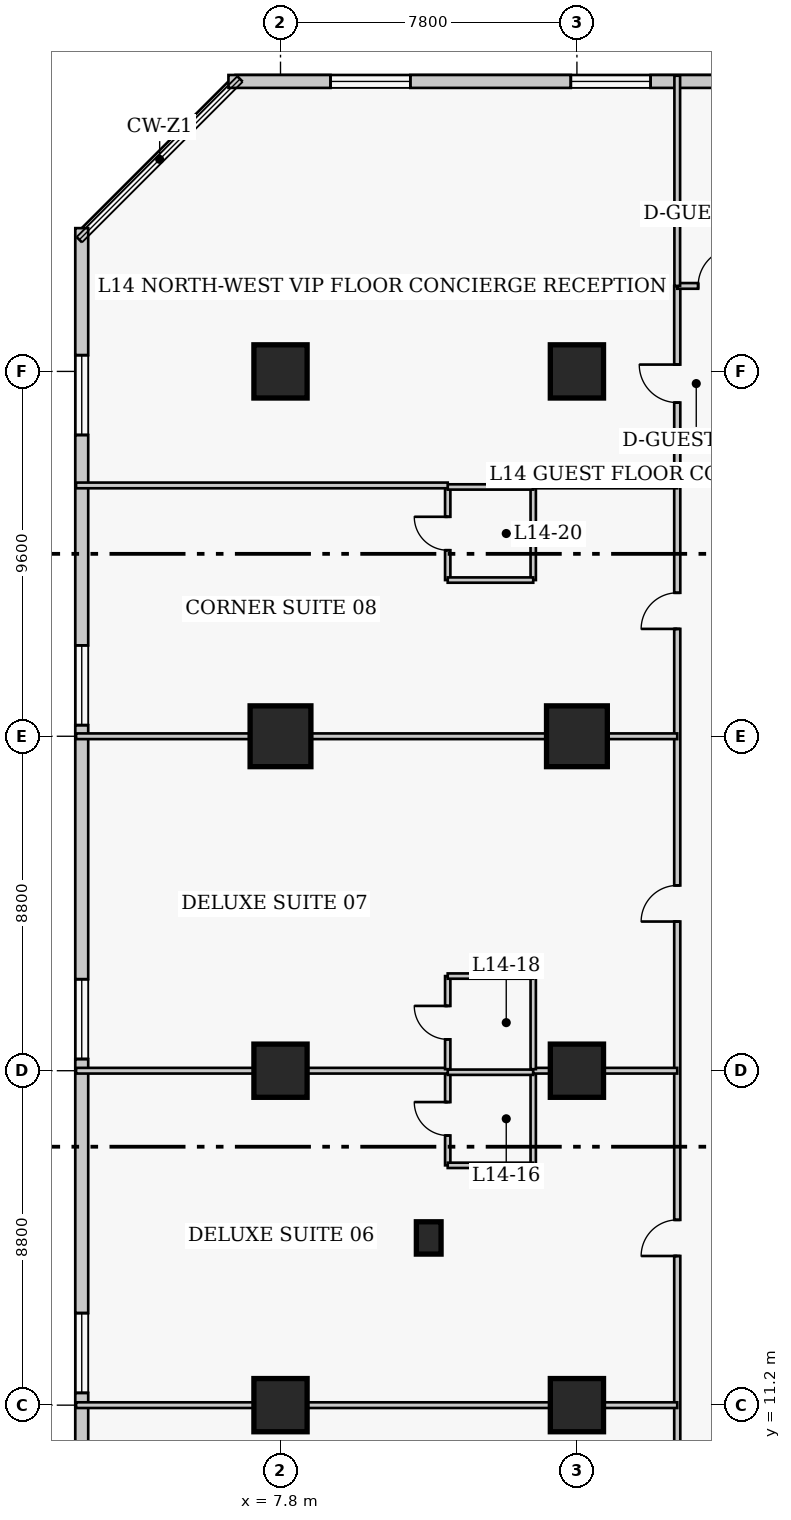
"""IFC4 building model, lengths in metres.
Left out: names, types, materials, properties, quantities, classifications, styles, units other than length and angle.
Written with IfcOpenShell. Run it as: python <this file> out.ifc"""

import sys

from ifc_helpers import new_model, si_unit, direction, frame, frame_2d, origin, origin_2d, place, context, subcontext, project, spatial, rectangle, extrude, element, fill, save


model = new_model("IFC4")
c1 = context("Model", 3, precision=1e-05, world=origin(), true_north=direction((0.0, 1.0)))
c2 = subcontext(c1, "Body", "Model", "MODEL_VIEW")
j1 = project(units=[si_unit("LENGTHUNIT", "METRE"), si_unit("PLANEANGLEUNIT", "RADIAN")], contexts=[c1])
p1 = place(None, origin())
s1 = spatial("IfcSite", under=j1, at=p1, CompositionType="ELEMENT")
p2 = place(p1, origin())
s2 = spatial("IfcBuilding", under=s1, at=p2, CompositionType="ELEMENT")
p3 = place(p2, frame((0.0, 0.0, 60.2)))
s3 = spatial("IfcBuildingStorey", under=s2, at=p3, CompositionType="ELEMENT", Elevation=60.2)
for number, where, z_axis, x_axis in (
    (1, (7.8, 11.2, 0.0), (0.0, 0.0, 1.0), (1.0, 0.0, 0.0)),
    (2, (7.8, 20.0, 0.0), (0.0, 0.0, 1.0), (1.0, 0.0, 0.0)),
):
    element("IfcColumn", number, at=place(p3, frame(where, z_axis=z_axis, x_axis=x_axis)), inside=s3, PredefinedType="COLUMN", context=c2, shape_type="SweptSolid", body=[
        extrude(rectangle(XDim=1.4, YDim=1.4, at=origin_2d()), origin(), (0.0, 0.0, 1.0), 3.8),
    ])
p4 = place(p3, frame((7.8, 28.8, 0.0), z_axis=(0.0, 0.0, 1.0), x_axis=(1.0, 0.0, 0.0)))
e3 = element("IfcColumn", 3, at=p4, inside=s3, PredefinedType="COLUMN", context=c2, shape_type="SweptSolid", body=[
    extrude(rectangle(XDim=1.6, YDim=1.6, at=origin_2d()), origin(), (0.0, 0.0, 1.0), 3.8),
])
for number, where, z_axis, x_axis in (
    (4, (7.8, 38.4, 0.0), (0.0, 0.0, 1.0), (1.0, 0.0, 0.0)),
    (5, (15.6, 11.2, 0.0), (0.0, 0.0, 1.0), (1.0, 0.0, 0.0)),
    (6, (15.6, 20.0, 0.0), (0.0, 0.0, 1.0), (1.0, 0.0, 0.0)),
):
    element("IfcColumn", number, at=place(p3, frame(where, z_axis=z_axis, x_axis=x_axis)), inside=s3, PredefinedType="COLUMN", context=c2, shape_type="SweptSolid", body=[
        extrude(rectangle(XDim=1.4, YDim=1.4, at=origin_2d()), origin(), (0.0, 0.0, 1.0), 3.8),
    ])
p5 = place(p3, frame((15.6, 28.8, 0.0), z_axis=(0.0, 0.0, 1.0), x_axis=(1.0, 0.0, 0.0)))
e7 = element("IfcColumn", 7, at=p5, inside=s3, PredefinedType="COLUMN", context=c2, shape_type="SweptSolid", body=[
    extrude(rectangle(XDim=1.6, YDim=1.6, at=origin_2d()), origin(), (0.0, 0.0, 1.0), 3.8),
])
p6 = place(p3, frame((15.6, 38.4, 0.0), z_axis=(0.0, 0.0, 1.0), x_axis=(1.0, 0.0, 0.0)))
e8 = element("IfcColumn", 8, at=p6, inside=s3, PredefinedType="COLUMN", context=c2, shape_type="SweptSolid", body=[
    extrude(rectangle(XDim=1.4, YDim=1.4, at=origin_2d()), origin(), (0.0, 0.0, 1.0), 3.8),
])
p7 = place(p3, frame((11.7, 15.6, 0.0), z_axis=(0.0, 0.0, 1.0), x_axis=(1.0, 0.0, 0.0)))
e9 = element("IfcColumn", 9, at=p7, inside=s3, PredefinedType="PILASTER", context=c2, shape_type="SweptSolid", body=[
    extrude(rectangle(XDim=0.65, YDim=0.85, at=origin_2d()), origin(), (0.0, 0.0, 1.0), 3.8),
])
p8 = place(p3, frame((36.32, 46.03, 0.0), z_axis=(0.0, 0.0, 1.0), x_axis=(-1.0, 0.0, 0.0)))
e10 = element("IfcWall", 10, at=p8, inside=s3, PredefinedType="SOLIDWALL", context=c2, shape_type="SweptSolid", body=[
    extrude(rectangle(XDim=29.89, YDim=0.34, at=frame_2d((14.945, 0.0))), origin(), (0.0, 0.0, 1.0), 3.54),
])
p9 = place(p8, frame((2.686, 0.0, 0.85)))
e11 = element("IfcOpeningElement", 11, at=p9, cuts=e10, PredefinedType="OPENING", context=c2, shape_type="SweptSolid", body=[
    extrude(rectangle(XDim=2.1, YDim=1.85, at=frame_2d((1.05, 0.925))), frame((0.0, 0.18, 0.0), z_axis=(0.0, -1.0, 0.0), x_axis=(1.0, 0.0, 0.0)), (0.0, 0.0, 1.0), 0.36),
])
p10 = place(p8, frame((10.159, 0.0, 0.85)))
e12 = element("IfcOpeningElement", 12, at=p10, cuts=e10, PredefinedType="OPENING", context=c2, shape_type="SweptSolid", body=[
    extrude(rectangle(XDim=2.1, YDim=1.85, at=frame_2d((1.05, 0.925))), frame((0.0, 0.18, 0.0), z_axis=(0.0, -1.0, 0.0), x_axis=(1.0, 0.0, 0.0)), (0.0, 0.0, 1.0), 0.36),
])
p11 = place(p8, frame((18.781, 0.0, 0.85)))
e13 = element("IfcOpeningElement", 13, at=p11, cuts=e10, PredefinedType="OPENING", context=c2, shape_type="SweptSolid", body=[
    extrude(rectangle(XDim=2.1, YDim=1.85, at=frame_2d((1.05, 0.925))), frame((0.0, 0.18, 0.0), z_axis=(0.0, -1.0, 0.0), x_axis=(1.0, 0.0, 0.0)), (0.0, 0.0, 1.0), 0.36),
])
p12 = place(p8, frame((25.104, 0.0, 0.85)))
e14 = element("IfcOpeningElement", 14, at=p12, cuts=e10, PredefinedType="OPENING", context=c2, shape_type="SweptSolid", body=[
    extrude(rectangle(XDim=2.1, YDim=1.85, at=frame_2d((1.05, 0.925))), frame((0.0, 0.18, 0.0), z_axis=(0.0, -1.0, 0.0), x_axis=(1.0, 0.0, 0.0)), (0.0, 0.0, 1.0), 0.36),
])
p13 = place(p3, frame((2.57, 42.17, 0.0), z_axis=(0.0, 0.0, 1.0), x_axis=(0.0, -1.0, 0.0)))
e15 = element("IfcWall", 15, at=p13, inside=s3, PredefinedType="SOLIDWALL", context=c2, shape_type="SweptSolid", body=[
    extrude(rectangle(XDim=35.14, YDim=0.34, at=frame_2d((17.57, 0.0))), origin(), (0.0, 0.0, 1.0), 3.54),
])
p14 = place(p13, frame((3.343, 0.0, 0.85)))
e16 = element("IfcOpeningElement", 16, at=p14, cuts=e15, PredefinedType="OPENING", context=c2, shape_type="SweptSolid", body=[
    extrude(rectangle(XDim=2.1, YDim=1.85, at=frame_2d((1.05, 0.925))), frame((0.0, 0.18, 0.0), z_axis=(0.0, -1.0, 0.0), x_axis=(1.0, 0.0, 0.0)), (0.0, 0.0, 1.0), 0.36),
])
p15 = place(p13, frame((10.978, 0.0, 0.85)))
e17 = element("IfcOpeningElement", 17, at=p15, cuts=e15, PredefinedType="OPENING", context=c2, shape_type="SweptSolid", body=[
    extrude(rectangle(XDim=2.1, YDim=1.85, at=frame_2d((1.05, 0.925))), frame((0.0, 0.18, 0.0), z_axis=(0.0, -1.0, 0.0), x_axis=(1.0, 0.0, 0.0)), (0.0, 0.0, 1.0), 0.36),
])
p16 = place(p13, frame((19.762, 0.0, 0.85)))
e18 = element("IfcOpeningElement", 18, at=p16, cuts=e15, PredefinedType="OPENING", context=c2, shape_type="SweptSolid", body=[
    extrude(rectangle(XDim=2.1, YDim=1.85, at=frame_2d((1.05, 0.925))), frame((0.0, 0.18, 0.0), z_axis=(0.0, -1.0, 0.0), x_axis=(1.0, 0.0, 0.0)), (0.0, 0.0, 1.0), 0.36),
])
p17 = place(p13, frame((28.548, 0.0, 0.85)))
e19 = element("IfcOpeningElement", 19, at=p17, cuts=e15, PredefinedType="OPENING", context=c2, shape_type="SweptSolid", body=[
    extrude(rectangle(XDim=2.1, YDim=1.85, at=frame_2d((1.05, 0.925))), frame((0.0, 0.18, 0.0), z_axis=(0.0, -1.0, 0.0), x_axis=(1.0, 0.0, 0.0)), (0.0, 0.0, 1.0), 0.36),
])
p18 = place(p3, frame((18.24, 5.05, 0.0), z_axis=(0.0, 0.0, 1.0), x_axis=(0.0, 1.0, 0.0)))
e20 = element("IfcWall", 20, at=p18, inside=s3, PredefinedType="PARTITIONING", context=c2, shape_type="SweptSolid", body=[
    extrude(rectangle(XDim=35.6, YDim=0.16, at=frame_2d((17.8, 0.0))), origin(), (0.0, 0.0, 1.0), 3.54),
])
p19 = place(p18, frame((2.6, 0.0, 0.0)))
e21 = element("IfcOpeningElement", 21, at=p19, cuts=e20, PredefinedType="OPENING", context=c2, shape_type="SweptSolid", body=[
    extrude(rectangle(XDim=0.95, YDim=2.1, at=frame_2d((0.475, 1.05))), frame((0.0, 0.09, 0.0), z_axis=(0.0, -1.0, 0.0), x_axis=(1.0, 0.0, 0.0)), (0.0, 0.0, 1.0), 0.18),
])
p20 = place(p18, frame((10.075, 0.0, 0.0)))
e22 = element("IfcOpeningElement", 22, at=p20, cuts=e20, PredefinedType="OPENING", context=c2, shape_type="SweptSolid", body=[
    extrude(rectangle(XDim=0.95, YDim=2.1, at=frame_2d((0.475, 1.05))), frame((0.0, 0.09, 0.0), z_axis=(0.0, -1.0, 0.0), x_axis=(1.0, 0.0, 0.0)), (0.0, 0.0, 1.0), 0.18),
])
p21 = place(p18, frame((18.875, 0.0, 0.0)))
e23 = element("IfcOpeningElement", 23, at=p21, cuts=e20, PredefinedType="OPENING", context=c2, shape_type="SweptSolid", body=[
    extrude(rectangle(XDim=0.95, YDim=2.1, at=frame_2d((0.475, 1.05))), frame((0.0, 0.09, 0.0), z_axis=(0.0, -1.0, 0.0), x_axis=(1.0, 0.0, 0.0)), (0.0, 0.0, 1.0), 0.18),
])
p22 = place(p18, frame((26.575, 0.0, 0.0)))
e24 = element("IfcOpeningElement", 24, at=p22, cuts=e20, PredefinedType="OPENING", context=c2, shape_type="SweptSolid", body=[
    extrude(rectangle(XDim=0.95, YDim=2.1, at=frame_2d((0.475, 1.05))), frame((0.0, 0.09, 0.0), z_axis=(0.0, -1.0, 0.0), x_axis=(1.0, 0.0, 0.0)), (0.0, 0.0, 1.0), 0.18),
])
p23 = place(p18, frame((32.53, 0.0, 0.0)))
e25 = element("IfcOpeningElement", 25, at=p23, cuts=e20, PredefinedType="OPENING", context=c2, shape_type="SweptSolid", body=[
    extrude(rectangle(XDim=1.0, YDim=2.15, at=frame_2d((0.5, 1.075))), frame((0.0, 0.09, 0.0), z_axis=(0.0, -1.0, 0.0), x_axis=(1.0, 0.0, 0.0)), (0.0, 0.0, 1.0), 0.18),
])
p24 = place(p3, frame((18.24, 40.65, 0.0), z_axis=(0.0, 0.0, 1.0), x_axis=(1.0, 0.0, 0.0)))
e26 = element("IfcWall", 26, at=p24, inside=s3, PredefinedType="PARTITIONING", context=c2, shape_type="SweptSolid", body=[
    extrude(rectangle(XDim=3.86, YDim=0.15, at=frame_2d((1.93, 0.0))), origin(), (0.0, 0.0, 1.0), 3.54),
])
p25 = place(p24, frame((0.55, 0.0, 0.0)))
e27 = element("IfcOpeningElement", 27, at=p25, cuts=e26, PredefinedType="OPENING", context=c2, shape_type="SweptSolid", body=[
    extrude(rectangle(XDim=1.0, YDim=2.15, at=frame_2d((0.5, 1.075))), frame((0.0, 0.085, 0.0), z_axis=(0.0, -1.0, 0.0), x_axis=(1.0, 0.0, 0.0)), (0.0, 0.0, 1.0), 0.17),
])
p26 = place(p3, frame((18.24, 40.65, 0.0), z_axis=(0.0, 0.0, 1.0), x_axis=(0.0, 1.0, 0.0)))
e28 = element("IfcWall", 28, at=p26, inside=s3, PredefinedType="PARTITIONING", context=c2, shape_type="SweptSolid", body=[
    extrude(rectangle(XDim=5.53, YDim=0.15, at=frame_2d((2.765, 0.0))), origin(), (0.0, 0.0, 1.0), 3.54),
])
p27 = place(p3, frame((2.42, 11.2, 0.0), z_axis=(0.0, 0.0, 1.0), x_axis=(1.0, 0.0, 0.0)))
e29 = element("IfcWall", 29, at=p27, inside=s3, PredefinedType="PARTITIONING", context=c2, shape_type="SweptSolid", body=[
    extrude(rectangle(XDim=15.82, YDim=0.15, at=frame_2d((7.91, 0.0))), origin(), (0.0, 0.0, 1.0), 2.593),
])
p28 = place(p3, frame((12.2, 17.51, 0.0), z_axis=(0.0, 0.0, 1.0), x_axis=(0.0, 1.0, 0.0)))
e30 = element("IfcWall", 30, at=p28, inside=s3, PredefinedType="PLUMBINGWALL", context=c2, shape_type="SweptSolid", body=[
    extrude(rectangle(XDim=2.45, YDim=0.14, at=frame_2d((1.225, 0.0))), origin(), (0.0, 0.0, 1.0), 3.54),
])
p29 = place(p28, frame((0.785, 0.0, 0.0)))
e31 = element("IfcOpeningElement", 31, at=p29, cuts=e30, PredefinedType="OPENING", context=c2, shape_type="SweptSolid", body=[
    extrude(rectangle(XDim=0.88, YDim=2.05, at=frame_2d((0.44, 1.025))), frame((0.0, 0.08, 0.0), z_axis=(0.0, -1.0, 0.0), x_axis=(1.0, 0.0, 0.0)), (0.0, 0.0, 1.0), 0.16),
])
p30 = place(p3, frame((14.45, 17.51, 0.0), z_axis=(0.0, 0.0, 1.0), x_axis=(0.0, 1.0, 0.0)))
e32 = element("IfcWall", 32, at=p30, inside=s3, PredefinedType="PLUMBINGWALL", context=c2, shape_type="SweptSolid", body=[
    extrude(rectangle(XDim=2.45, YDim=0.14, at=frame_2d((1.225, 0.0))), origin(), (0.0, 0.0, 1.0), 3.54),
])
p31 = place(p3, frame((12.2, 17.51, 0.0), z_axis=(0.0, 0.0, 1.0), x_axis=(1.0, 0.0, 0.0)))
e33 = element("IfcWall", 33, at=p31, inside=s3, PredefinedType="PLUMBINGWALL", context=c2, shape_type="SweptSolid", body=[
    extrude(rectangle(XDim=2.25, YDim=0.14, at=frame_2d((1.125, 0.0))), origin(), (0.0, 0.0, 1.0), 3.54),
])
p32 = place(p3, frame((12.2, 19.96, 0.0), z_axis=(0.0, 0.0, 1.0), x_axis=(1.0, 0.0, 0.0)))
e34 = element("IfcWall", 34, at=p32, inside=s3, PredefinedType="PLUMBINGWALL", context=c2, shape_type="SweptSolid", body=[
    extrude(rectangle(XDim=2.25, YDim=0.14, at=frame_2d((1.125, 0.0))), origin(), (0.0, 0.0, 1.0), 2.593),
])
p33 = place(p3, frame((2.42, 20.0, 0.0), z_axis=(0.0, 0.0, 1.0), x_axis=(1.0, 0.0, 0.0)))
e35 = element("IfcWall", 35, at=p33, inside=s3, PredefinedType="PARTITIONING", context=c2, shape_type="SweptSolid", body=[
    extrude(rectangle(XDim=9.78, YDim=0.15, at=frame_2d((4.89, 0.0))), origin(), (0.0, 0.0, 1.0), 2.593),
])
p34 = place(p3, frame((14.45, 20.0, 0.0), z_axis=(0.0, 0.0, 1.0), x_axis=(1.0, 0.0, 0.0)))
e36 = element("IfcWall", 36, at=p34, inside=s3, PredefinedType="PARTITIONING", context=c2, shape_type="SweptSolid", body=[
    extrude(rectangle(XDim=3.79, YDim=0.15, at=frame_2d((1.895, 0.0))), origin(), (0.0, 0.0, 1.0), 2.593),
])
p35 = place(p3, frame((12.2, 20.04, 0.0), z_axis=(0.0, 0.0, 1.0), x_axis=(0.0, 1.0, 0.0)))
e37 = element("IfcWall", 37, at=p35, inside=s3, PredefinedType="PLUMBINGWALL", context=c2, shape_type="SweptSolid", body=[
    extrude(rectangle(XDim=2.45, YDim=0.14, at=frame_2d((1.225, 0.0))), origin(), (0.0, 0.0, 1.0), 3.54),
])
p36 = place(p35, frame((0.785, 0.0, 0.0)))
e38 = element("IfcOpeningElement", 38, at=p36, cuts=e37, PredefinedType="OPENING", context=c2, shape_type="SweptSolid", body=[
    extrude(rectangle(XDim=0.88, YDim=2.05, at=frame_2d((0.44, 1.025))), frame((0.0, 0.08, 0.0), z_axis=(0.0, -1.0, 0.0), x_axis=(1.0, 0.0, 0.0)), (0.0, 0.0, 1.0), 0.16),
])
p37 = place(p3, frame((14.45, 20.04, 0.0), z_axis=(0.0, 0.0, 1.0), x_axis=(0.0, 1.0, 0.0)))
e39 = element("IfcWall", 39, at=p37, inside=s3, PredefinedType="PLUMBINGWALL", context=c2, shape_type="SweptSolid", body=[
    extrude(rectangle(XDim=2.45, YDim=0.14, at=frame_2d((1.225, 0.0))), origin(), (0.0, 0.0, 1.0), 3.54),
])
p38 = place(p3, frame((12.2, 22.49, 0.0), z_axis=(0.0, 0.0, 1.0), x_axis=(1.0, 0.0, 0.0)))
e40 = element("IfcWall", 40, at=p38, inside=s3, PredefinedType="PLUMBINGWALL", context=c2, shape_type="SweptSolid", body=[
    extrude(rectangle(XDim=2.25, YDim=0.14, at=frame_2d((1.125, 0.0))), origin(), (0.0, 0.0, 1.0), 3.54),
])
p39 = place(p3, frame((2.42, 28.8, 0.0), z_axis=(0.0, 0.0, 1.0), x_axis=(1.0, 0.0, 0.0)))
e41 = element("IfcWall", 41, at=p39, inside=s3, PredefinedType="PARTITIONING", context=c2, shape_type="SweptSolid", body=[
    extrude(rectangle(XDim=15.82, YDim=0.15, at=frame_2d((7.91, 0.0))), origin(), (0.0, 0.0, 1.0), 2.593),
])
p40 = place(p3, frame((12.2, 32.91, 0.0), z_axis=(0.0, 0.0, 1.0), x_axis=(0.0, 1.0, 0.0)))
e42 = element("IfcWall", 42, at=p40, inside=s3, PredefinedType="PLUMBINGWALL", context=c2, shape_type="SweptSolid", body=[
    extrude(rectangle(XDim=2.45, YDim=0.14, at=frame_2d((1.225, 0.0))), origin(), (0.0, 0.0, 1.0), 3.54),
])
p41 = place(p40, frame((0.785, 0.0, 0.0)))
e43 = element("IfcOpeningElement", 43, at=p41, cuts=e42, PredefinedType="OPENING", context=c2, shape_type="SweptSolid", body=[
    extrude(rectangle(XDim=0.88, YDim=2.05, at=frame_2d((0.44, 1.025))), frame((0.0, 0.08, 0.0), z_axis=(0.0, -1.0, 0.0), x_axis=(1.0, 0.0, 0.0)), (0.0, 0.0, 1.0), 0.16),
])
p42 = place(p3, frame((14.45, 32.91, 0.0), z_axis=(0.0, 0.0, 1.0), x_axis=(0.0, 1.0, 0.0)))
e44 = element("IfcWall", 44, at=p42, inside=s3, PredefinedType="PLUMBINGWALL", context=c2, shape_type="SweptSolid", body=[
    extrude(rectangle(XDim=2.45, YDim=0.14, at=frame_2d((1.225, 0.0))), origin(), (0.0, 0.0, 1.0), 3.54),
])
for number, where, z_axis, x_axis in (
    (45, (12.2, 32.91, 0.0), (0.0, 0.0, 1.0), (1.0, 0.0, 0.0)),
    (46, (12.2, 35.36, 0.0), (0.0, 0.0, 1.0), (1.0, 0.0, 0.0)),
):
    element("IfcWall", number, at=place(p3, frame(where, z_axis=z_axis, x_axis=x_axis)), inside=s3, PredefinedType="PLUMBINGWALL", context=c2, shape_type="SweptSolid", body=[
        extrude(rectangle(XDim=2.25, YDim=0.14, at=frame_2d((1.125, 0.0))), origin(), (0.0, 0.0, 1.0), 3.54),
    ])
p43 = place(p3, frame((2.42, 35.4, 0.0), z_axis=(0.0, 0.0, 1.0), x_axis=(1.0, 0.0, 0.0)))
e47 = element("IfcWall", 47, at=p43, inside=s3, PredefinedType="PARTITIONING", context=c2, shape_type="SweptSolid", body=[
    extrude(rectangle(XDim=9.78, YDim=0.15, at=frame_2d((4.89, 0.0))), origin(), (0.0, 0.0, 1.0), 3.54),
])
p44 = place(p3, frame((14.45, 35.4, 0.0), z_axis=(0.0, 0.0, 1.0), x_axis=(1.0, 0.0, 0.0)))
e48 = element("IfcWall", 48, at=p44, inside=s3, PredefinedType="PARTITIONING", context=c2, shape_type="SweptSolid", body=[
    extrude(rectangle(XDim=3.79, YDim=0.15, at=frame_2d((1.895, 0.0))), origin(), (0.0, 0.0, 1.0), 3.54),
])
p45 = place(p11, origin())
e49 = element("IfcWindow", 49, at=p45, inside=s3, PartitioningType="SINGLE_PANEL", PredefinedType="WINDOW", context=c2, shape_type="SweptSolid", body=[
    extrude(rectangle(XDim=2.1, YDim=1.85, at=frame_2d((1.05, 0.925))), frame((0.0, 0.03, 0.0), z_axis=(0.0, -1.0, 0.0), x_axis=(1.0, 0.0, 0.0)), (0.0, 0.0, 1.0), 0.06),
])
fill(e13, e49)
p46 = place(p12, origin())
e50 = element("IfcWindow", 50, at=p46, inside=s3, PartitioningType="SINGLE_PANEL", PredefinedType="WINDOW", context=c2, shape_type="SweptSolid", body=[
    extrude(rectangle(XDim=2.1, YDim=1.85, at=frame_2d((1.05, 0.925))), frame((0.0, 0.03, 0.0), z_axis=(0.0, -1.0, 0.0), x_axis=(1.0, 0.0, 0.0)), (0.0, 0.0, 1.0), 0.06),
])
fill(e14, e50)
p47 = place(p14, origin())
e51 = element("IfcWindow", 51, at=p47, inside=s3, PartitioningType="SINGLE_PANEL", PredefinedType="WINDOW", context=c2, shape_type="SweptSolid", body=[
    extrude(rectangle(XDim=2.1, YDim=1.85, at=frame_2d((1.05, 0.925))), frame((0.0, 0.03, 0.0), z_axis=(0.0, -1.0, 0.0), x_axis=(1.0, 0.0, 0.0)), (0.0, 0.0, 1.0), 0.06),
])
fill(e16, e51)
p48 = place(p15, origin())
e52 = element("IfcWindow", 52, at=p48, inside=s3, PartitioningType="SINGLE_PANEL", PredefinedType="WINDOW", context=c2, shape_type="SweptSolid", body=[
    extrude(rectangle(XDim=2.1, YDim=1.85, at=frame_2d((1.05, 0.925))), frame((0.0, 0.03, 0.0), z_axis=(0.0, -1.0, 0.0), x_axis=(1.0, 0.0, 0.0)), (0.0, 0.0, 1.0), 0.06),
])
fill(e17, e52)
p49 = place(p16, origin())
e53 = element("IfcWindow", 53, at=p49, inside=s3, PartitioningType="SINGLE_PANEL", PredefinedType="WINDOW", context=c2, shape_type="SweptSolid", body=[
    extrude(rectangle(XDim=2.1, YDim=1.85, at=frame_2d((1.05, 0.925))), frame((0.0, 0.03, 0.0), z_axis=(0.0, -1.0, 0.0), x_axis=(1.0, 0.0, 0.0)), (0.0, 0.0, 1.0), 0.06),
])
fill(e18, e53)
p50 = place(p17, origin())
e54 = element("IfcWindow", 54, at=p50, inside=s3, PartitioningType="SINGLE_PANEL", PredefinedType="WINDOW", context=c2, shape_type="SweptSolid", body=[
    extrude(rectangle(XDim=2.1, YDim=1.85, at=frame_2d((1.05, 0.925))), frame((0.0, 0.03, 0.0), z_axis=(0.0, -1.0, 0.0), x_axis=(1.0, 0.0, 0.0)), (0.0, 0.0, 1.0), 0.06),
])
fill(e19, e54)
p51 = place(p25, origin())
e55 = element("IfcDoor", 55, at=p51, inside=s3, OperationType="SINGLE_SWING_RIGHT", PredefinedType="DOOR", context=c2, shape_type="SweptSolid", body=[
    extrude(rectangle(XDim=1.0, YDim=2.15, at=frame_2d((0.5, 1.075))), frame((0.0, 0.025, 0.0), z_axis=(0.0, -1.0, 0.0), x_axis=(1.0, 0.0, 0.0)), (0.0, 0.0, 1.0), 0.05),
])
fill(e27, e55)
p52 = place(p29, origin())
e56 = element("IfcDoor", 56, at=p52, inside=s3, OperationType="SINGLE_SWING_RIGHT", PredefinedType="DOOR", context=c2, shape_type="SweptSolid", body=[
    extrude(rectangle(XDim=0.88, YDim=2.05, at=frame_2d((0.44, 1.025))), frame((0.0, 0.025, 0.0), z_axis=(0.0, -1.0, 0.0), x_axis=(1.0, 0.0, 0.0)), (0.0, 0.0, 1.0), 0.05),
])
fill(e31, e56)
p53 = place(p20, origin())
e57 = element("IfcDoor", 57, at=p53, inside=s3, OperationType="SINGLE_SWING_LEFT", PredefinedType="DOOR", context=c2, shape_type="SweptSolid", body=[
    extrude(rectangle(XDim=0.95, YDim=2.1, at=frame_2d((0.475, 1.05))), frame((0.0, 0.025, 0.0), z_axis=(0.0, -1.0, 0.0), x_axis=(1.0, 0.0, 0.0)), (0.0, 0.0, 1.0), 0.05),
])
fill(e22, e57)
p54 = place(p36, origin())
e58 = element("IfcDoor", 58, at=p54, inside=s3, OperationType="SINGLE_SWING_RIGHT", PredefinedType="DOOR", context=c2, shape_type="SweptSolid", body=[
    extrude(rectangle(XDim=0.88, YDim=2.05, at=frame_2d((0.44, 1.025))), frame((0.0, 0.025, 0.0), z_axis=(0.0, -1.0, 0.0), x_axis=(1.0, 0.0, 0.0)), (0.0, 0.0, 1.0), 0.05),
])
fill(e38, e58)
p55 = place(p21, origin())
e59 = element("IfcDoor", 59, at=p55, inside=s3, OperationType="SINGLE_SWING_LEFT", PredefinedType="DOOR", context=c2, shape_type="SweptSolid", body=[
    extrude(rectangle(XDim=0.95, YDim=2.1, at=frame_2d((0.475, 1.05))), frame((0.0, 0.025, 0.0), z_axis=(0.0, -1.0, 0.0), x_axis=(1.0, 0.0, 0.0)), (0.0, 0.0, 1.0), 0.05),
])
fill(e23, e59)
p56 = place(p41, origin())
e60 = element("IfcDoor", 60, at=p56, inside=s3, OperationType="SINGLE_SWING_RIGHT", PredefinedType="DOOR", context=c2, shape_type="SweptSolid", body=[
    extrude(rectangle(XDim=0.88, YDim=2.05, at=frame_2d((0.44, 1.025))), frame((0.0, 0.025, 0.0), z_axis=(0.0, -1.0, 0.0), x_axis=(1.0, 0.0, 0.0)), (0.0, 0.0, 1.0), 0.05),
])
fill(e43, e60)
p57 = place(p22, origin())
e61 = element("IfcDoor", 61, at=p57, inside=s3, OperationType="SINGLE_SWING_LEFT", PredefinedType="DOOR", context=c2, shape_type="SweptSolid", body=[
    extrude(rectangle(XDim=0.95, YDim=2.1, at=frame_2d((0.475, 1.05))), frame((0.0, 0.025, 0.0), z_axis=(0.0, -1.0, 0.0), x_axis=(1.0, 0.0, 0.0)), (0.0, 0.0, 1.0), 0.05),
])
fill(e24, e61)
p58 = place(p23, origin())
e62 = element("IfcDoor", 62, at=p58, inside=s3, OperationType="SINGLE_SWING_RIGHT", PredefinedType="DOOR", context=c2, shape_type="SweptSolid", body=[
    extrude(rectangle(XDim=1.0, YDim=2.15, at=frame_2d((0.5, 1.075))), frame((0.0, 0.025, 0.0), z_axis=(0.0, -1.0, 0.0), x_axis=(1.0, 0.0, 0.0)), (0.0, 0.0, 1.0), 0.05),
])
fill(e25, e62)
save(model, sys.argv[1])
